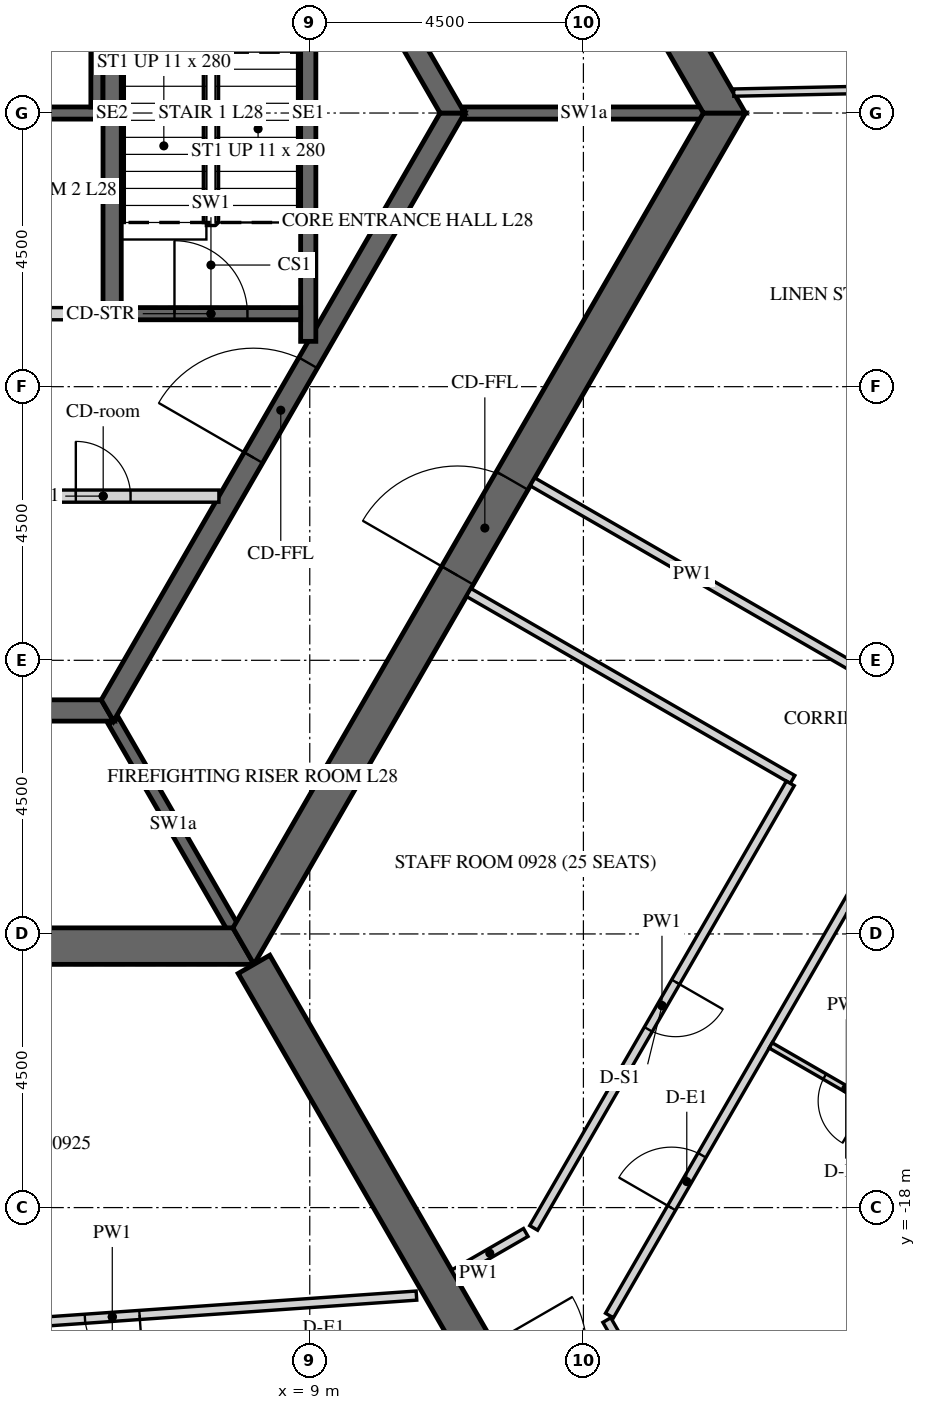
"""IFC4 building model, lengths in metres.
Left out: names, types, materials, properties, quantities, classifications, styles, units other than length and angle.
Written with IfcOpenShell. Run it as: python <this file> out.ifc"""

import sys

from ifc_helpers import new_model, si_unit, direction, frame, frame_2d, origin, place, context, subcontext, project, spatial, polyline, rectangle, outline, extrude, element, fill, save


model = new_model("IFC4")
c1 = context("Model", 3, precision=1e-05, world=origin(), true_north=direction((0.0, 1.0)))
c2 = subcontext(c1, "Body", "Model", "MODEL_VIEW")
j1 = project(units=[si_unit("LENGTHUNIT", "METRE"), si_unit("PLANEANGLEUNIT", "RADIAN")], contexts=[c1])
p1 = place(None, origin())
s1 = spatial("IfcSite", under=j1, at=p1, CompositionType="ELEMENT")
p2 = place(p1, origin())
s2 = spatial("IfcBuilding", under=s1, at=p2, CompositionType="ELEMENT")
p3 = place(p2, frame((0.0, 0.0, 123.3)))
s3 = spatial("IfcBuildingStorey", under=s2, at=p3, CompositionType="ELEMENT", Elevation=123.3)
p4 = place(p3, frame((-7.91, -13.7, -0.15), z_axis=(0.0, 0.0, 1.0), x_axis=(1.0, 0.0, 0.0)))
e1 = element("IfcWall", 1, at=p4, inside=s3, PredefinedType="SHEAR", context=c2, shape_type="SweptSolid", body=[
    extrude(outline(polyline([(-0.173, -0.3), (15.993, -0.3), (15.646, 0.3), (0.173, 0.3), (-0.173, -0.3)])), origin(), (0.0, 0.0, 1.0), 3.9),
])
p5 = place(p4, frame((7.31, 0.0, 0.15)))
e2 = element("IfcOpeningElement", 2, at=p5, cuts=e1, PredefinedType="OPENING", context=c2, shape_type="SweptSolid", body=[
    extrude(rectangle(XDim=1.2, YDim=2.4, at=frame_2d((0.6, 1.2))), frame((0.0, 0.31, 0.0), z_axis=(0.0, -1.0, 0.0), x_axis=(1.0, 0.0, 0.0)), (0.0, 0.0, 1.0), 0.62),
])
p6 = place(p3, frame((7.91, -13.7, -0.15), z_axis=(0.0, 0.0, 1.0), x_axis=(0.499999880136, 0.866025472988, 0.0)))
e3 = element("IfcWall", 3, at=p6, inside=s3, PredefinedType="SHEAR", context=c2, shape_type="SweptSolid", body=[
    extrude(outline(polyline([(-0.173, -0.3), (15.993, -0.3), (15.646, 0.3), (0.173, 0.3), (-0.173, -0.3)])), origin(), (0.0, 0.0, 1.0), 3.9),
])
p7 = place(p6, frame((7.039, 0.0, 0.15)))
e4 = element("IfcOpeningElement", 4, at=p7, cuts=e3, PredefinedType="OPENING", context=c2, shape_type="SweptSolid", body=[
    extrude(rectangle(XDim=1.8, YDim=2.4, at=frame_2d((0.9, 1.2))), frame((0.0, 0.31, 0.0), z_axis=(0.0, -1.0, 0.0), x_axis=(1.0, 0.0, 0.0)), (0.0, 0.0, 1.0), 0.62),
])
p8 = place(p3, frame((15.819, 0.0, -0.15), z_axis=(0.0, 0.0, 1.0), x_axis=(-0.499999880136, 0.866025472988, 0.0)))
e5 = element("IfcWall", 5, at=p8, inside=s3, PredefinedType="SHEAR", context=c2, shape_type="SweptSolid", body=[
    extrude(outline(polyline([(-0.173, -0.3), (15.993, -0.3), (15.646, 0.3), (0.173, 0.3), (-0.173, -0.3)])), origin(), (0.0, 0.0, 1.0), 3.9),
])
p9 = place(p8, frame((6.981, 0.0, 0.15)))
e6 = element("IfcOpeningElement", 6, at=p9, cuts=e5, PredefinedType="OPENING", context=c2, shape_type="SweptSolid", body=[
    extrude(rectangle(XDim=1.8, YDim=2.4, at=frame_2d((0.9, 1.2))), frame((0.0, 0.31, 0.0), z_axis=(0.0, -1.0, 0.0), x_axis=(1.0, 0.0, 0.0)), (0.0, 0.0, 1.0), 0.62),
])
p10 = place(p3, frame((8.083, -14.0, -0.15), z_axis=(0.0, 0.0, 1.0), x_axis=(0.499997680643, -0.866026742862, 0.0)))
e7 = element("IfcWall", 7, at=p10, inside=s3, PredefinedType="SHEAR", context=c2, shape_type="SweptSolid", body=[
    extrude(rectangle(XDim=16.509, YDim=0.6, at=frame_2d((8.254, 0.0))), origin(), (0.0, 0.0, 1.0), 3.9),
])
p11 = place(p10, frame((7.354, 0.0, 0.15)))
e8 = element("IfcOpeningElement", 8, at=p11, cuts=e7, PredefinedType="OPENING", context=c2, shape_type="SweptSolid", body=[
    extrude(rectangle(XDim=1.8, YDim=2.4, at=frame_2d((0.9, 1.2))), frame((0.0, 0.31, 0.0), z_axis=(0.0, -1.0, 0.0), x_axis=(1.0, 0.0, 0.0)), (0.0, 0.0, 1.0), 0.62),
])
p12 = place(p3, frame((-5.673, -9.825, -0.15), z_axis=(0.0, 0.0, 1.0), x_axis=(1.0, 0.0, 0.0)))
e9 = element("IfcWall", 9, at=p12, inside=s3, PredefinedType="SHEAR", context=c2, shape_type="SweptSolid", body=[
    extrude(outline(polyline([(-0.101, -0.175), (11.446, -0.175), (11.244, 0.175), (0.101, 0.175), (-0.101, -0.175)])), origin(), (0.0, 0.0, 1.0), 3.9),
])
p13 = place(p3, frame((5.673, -9.825, -0.15), z_axis=(0.0, 0.0, 1.0), x_axis=(0.499995046907, 0.866028263435, 0.0)))
e10 = element("IfcWall", 10, at=p13, inside=s3, PredefinedType="SHEAR", context=c2, shape_type="SweptSolid", body=[
    extrude(outline(polyline([(-0.101, -0.175), (11.446, -0.175), (11.244, 0.175), (0.101, 0.175), (-0.101, -0.175)])), origin(), (0.0, 0.0, 1.0), 3.9),
])
p14 = place(p13, frame((4.801, 0.0, 0.15)))
e11 = element("IfcOpeningElement", 11, at=p14, cuts=e10, PredefinedType="OPENING", context=c2, shape_type="SweptSolid", body=[
    extrude(rectangle(XDim=1.8, YDim=2.4, at=frame_2d((0.9, 1.2))), frame((0.0, 0.185, 0.0), z_axis=(0.0, -1.0, 0.0), x_axis=(1.0, 0.0, 0.0)), (0.0, 0.0, 1.0), 0.37),
])
p15 = place(p3, frame((11.345, 0.0, -0.15), z_axis=(0.0, 0.0, 1.0), x_axis=(-0.499995046907, 0.866028263435, 0.0)))
e12 = element("IfcWall", 12, at=p15, inside=s3, PredefinedType="SHEAR", context=c2, shape_type="SweptSolid", body=[
    extrude(outline(polyline([(-0.101, -0.175), (11.446, -0.175), (11.244, 0.175), (0.101, 0.175), (-0.101, -0.175)])), origin(), (0.0, 0.0, 1.0), 3.9),
])
p16 = place(p15, frame((4.744, 0.0, 0.15)))
e13 = element("IfcOpeningElement", 13, at=p16, cuts=e12, PredefinedType="OPENING", context=c2, shape_type="SweptSolid", body=[
    extrude(rectangle(XDim=1.8, YDim=2.4, at=frame_2d((0.9, 1.2))), frame((0.0, 0.185, 0.0), z_axis=(0.0, -1.0, 0.0), x_axis=(1.0, 0.0, 0.0)), (0.0, 0.0, 1.0), 0.37),
])
p17 = place(p3, frame((-5.6, 0.0, -0.25), z_axis=(0.0, 0.0, 1.0), x_axis=(1.0, 0.0, 0.0)))
e14 = element("IfcWall", 14, at=p17, inside=s3, PredefinedType="SHEAR", context=c2, shape_type="SweptSolid", body=[
    extrude(rectangle(XDim=11.2, YDim=0.2, at=frame_2d((5.6, 0.0))), origin(), (0.0, 0.0, 1.0), 3.9),
])
p18 = place(p3, frame((5.5, 0.1, -0.25), z_axis=(0.0, 0.0, 1.0), x_axis=(0.0, 1.0, 0.0)))
e15 = element("IfcWall", 15, at=p18, inside=s3, PredefinedType="SHEAR", context=c2, shape_type="SweptSolid", body=[
    extrude(rectangle(XDim=3.1, YDim=0.2, at=frame_2d((1.55, 0.0))), origin(), (0.0, 0.0, 1.0), 3.9),
])
p19 = place(p3, frame((0.1, -3.3, 0.0), z_axis=(0.0, 0.0, 1.0), x_axis=(1.0, 0.0, 0.0)))
e16 = element("IfcWall", 16, at=p19, inside=s3, PredefinedType="PARTITIONING", context=c2, shape_type="SweptSolid", body=[
    extrude(rectangle(XDim=5.5, YDim=0.2, at=frame_2d((2.75, 0.0))), origin(), (0.0, 0.0, 1.0), 3.65),
])
p20 = place(p19, frame((2.3, 0.0, 0.0)))
e17 = element("IfcOpeningElement", 17, at=p20, cuts=e16, PredefinedType="OPENING", context=c2, shape_type="SweptSolid", body=[
    extrude(rectangle(XDim=0.9, YDim=2.1, at=frame_2d((0.45, 1.05))), frame((0.0, 0.11, 0.0), z_axis=(0.0, -1.0, 0.0), x_axis=(1.0, 0.0, 0.0)), (0.0, 0.0, 1.0), 0.22),
])
p21 = place(p3, frame((3.7, -6.3, 0.0), z_axis=(0.0, 0.0, 1.0), x_axis=(1.0, 0.0, 0.0)))
e18 = element("IfcWall", 18, at=p21, inside=s3, PredefinedType="PARTITIONING", context=c2, shape_type="SweptSolid", body=[
    extrude(rectangle(XDim=3.806, YDim=0.2, at=frame_2d((1.903, 0.0))), origin(), (0.0, 0.0, 1.0), 3.65),
])
p22 = place(p21, frame((1.453, 0.0, 0.0)))
e19 = element("IfcOpeningElement", 19, at=p22, cuts=e18, PredefinedType="OPENING", context=c2, shape_type="SweptSolid", body=[
    extrude(rectangle(XDim=0.9, YDim=2.1, at=frame_2d((0.45, 1.05))), frame((0.0, 0.11, 0.0), z_axis=(0.0, -1.0, 0.0), x_axis=(1.0, 0.0, 0.0)), (0.0, 0.0, 1.0), 0.22),
])
p23 = place(p3, frame((11.547, 0.0, -0.15), z_axis=(0.0, 0.0, 1.0), x_axis=(1.0, 0.0, 0.0)))
e20 = element("IfcWall", 20, at=p23, inside=s3, PredefinedType="SHEAR", context=c2, shape_type="SweptSolid", body=[
    extrude(rectangle(XDim=3.926, YDim=0.2, at=frame_2d((1.963, 0.0))), origin(), (0.0, 0.0, 1.0), 3.9),
])
p24 = place(p3, frame((5.773, -10.0, -0.15), z_axis=(0.0, 0.0, 1.0), x_axis=(0.500038251005, -0.86600331843, 0.0)))
e21 = element("IfcWall", 21, at=p24, inside=s3, PredefinedType="SHEAR", context=c2, shape_type="SweptSolid", body=[
    extrude(rectangle(XDim=3.926, YDim=0.2, at=frame_2d((1.963, 0.0))), origin(), (0.0, 0.0, 1.0), 3.9),
])
p25 = place(p3, frame((5.75, -3.4, -0.25), z_axis=(0.0, 0.0, 1.0), x_axis=(0.0, 1.0, 0.0)))
e22 = element("IfcWall", 22, at=p25, inside=s3, PredefinedType="SHEAR", context=c2, shape_type="SweptSolid", body=[
    extrude(rectangle(XDim=6.8, YDim=0.3, at=frame_2d((3.4, 0.0))), origin(), (0.0, 0.0, 1.0), 3.9),
])
p26 = place(p3, frame((8.975, -3.755, -0.25), z_axis=(0.0, 0.0, 1.0), x_axis=(0.0, 1.0, 0.0)))
e23 = element("IfcWall", 23, at=p26, inside=s3, PredefinedType="SHEAR", context=c2, shape_type="SweptSolid", body=[
    extrude(rectangle(XDim=7.51, YDim=0.25, at=frame_2d((3.755, 0.0))), origin(), (0.0, 0.0, 1.0), 3.9),
])
p27 = place(p3, frame((5.9, -3.3, -0.25), z_axis=(0.0, 0.0, 1.0), x_axis=(1.0, 0.0, 0.0)))
e24 = element("IfcWall", 24, at=p27, inside=s3, PredefinedType="SHEAR", context=c2, shape_type="SweptSolid", body=[
    extrude(rectangle(XDim=2.95, YDim=0.2, at=frame_2d((1.475, 0.0))), origin(), (0.0, 0.0, 1.0), 3.9),
])
p28 = place(p27, frame((0.875, 0.0, 0.25)))
e25 = element("IfcOpeningElement", 25, at=p28, cuts=e24, PredefinedType="OPENING", context=c2, shape_type="SweptSolid", body=[
    extrude(rectangle(XDim=1.2, YDim=2.4, at=frame_2d((0.6, 1.2))), frame((0.0, 0.11, 0.0), z_axis=(0.0, -1.0, 0.0), x_axis=(1.0, 0.0, 0.0)), (0.0, 0.0, 1.0), 0.22),
])
p29 = place(p3, frame((10.754, -19.447, 0.0), z_axis=(0.0, 0.0, 1.0), x_axis=(-0.997564830966, -0.069745308232, 0.0)))
e26 = element("IfcWall", 26, at=p29, inside=s3, PredefinedType="PARTITIONING", context=c2, shape_type="SweptSolid", body=[
    extrude(rectangle(XDim=10.029, YDim=0.15, at=frame_2d((5.014, 0.0))), origin(), (0.0, 0.0, 1.0), 2.988),
])
p30 = place(p29, frame((4.564, 0.0, 0.0)))
e27 = element("IfcOpeningElement", 27, at=p30, cuts=e26, PredefinedType="OPENING", context=c2, shape_type="SweptSolid", body=[
    extrude(rectangle(XDim=0.9, YDim=2.1, at=frame_2d((0.45, 1.05))), frame((0.0, 0.085, 0.0), z_axis=(0.0, -1.0, 0.0), x_axis=(1.0, 0.0, 0.0)), (0.0, 0.0, 1.0), 0.17),
])
p31 = place(p3, frame((15.441, -22.545, 0.0), z_axis=(0.0, 0.0, 1.0), x_axis=(-0.500037089193, 0.86600398927, 0.0)))
e28 = element("IfcWall", 28, at=p31, inside=s3, PredefinedType="PARTITIONING", context=c2, shape_type="SweptSolid", body=[
    extrude(rectangle(XDim=3.112, YDim=0.15, at=frame_2d((1.556, 0.0))), origin(), (0.0, 0.0, 1.0), 2.988),
])
p32 = place(p3, frame((13.928, -19.775, 0.0), z_axis=(0.0, 0.0, 1.0), x_axis=(0.50000450071, 0.866022805283, 0.0)))
e29 = element("IfcWall", 29, at=p32, inside=s3, PredefinedType="PARTITIONING", context=c2, shape_type="SweptSolid", body=[
    extrude(rectangle(XDim=23.877, YDim=0.15, at=frame_2d((11.938, 0.0))), origin(), (0.0, 0.0, 1.0), 2.988),
])
p33 = place(p32, frame((2.043, 0.0, 0.0)))
e30 = element("IfcOpeningElement", 30, at=p33, cuts=e29, PredefinedType="OPENING", context=c2, shape_type="SweptSolid", body=[
    extrude(rectangle(XDim=1.0, YDim=2.1, at=frame_2d((0.5, 1.05))), frame((0.0, 0.085, 0.0), z_axis=(0.0, -1.0, 0.0), x_axis=(1.0, 0.0, 0.0)), (0.0, 0.0, 1.0), 0.17),
])
p34 = place(p32, frame((13.272, 0.0, 0.0)))
e31 = element("IfcOpeningElement", 31, at=p34, cuts=e29, PredefinedType="OPENING", context=c2, shape_type="SweptSolid", body=[
    extrude(rectangle(XDim=1.0, YDim=2.1, at=frame_2d((0.5, 1.05))), frame((0.0, 0.085, 0.0), z_axis=(0.0, -1.0, 0.0), x_axis=(1.0, 0.0, 0.0)), (0.0, 0.0, 1.0), 0.17),
])
p35 = place(p3, frame((25.821, 0.972, 0.0), z_axis=(0.0, 0.0, 1.0), x_axis=(-0.559193816298, 0.829036956845, 0.0)))
e32 = element("IfcWall", 32, at=p35, inside=s3, PredefinedType="PARTITIONING", context=c2, shape_type="SweptSolid", body=[
    extrude(rectangle(XDim=22.002, YDim=0.15, at=frame_2d((11.001, 0.0))), origin(), (0.0, 0.0, 1.0), 2.988),
])
p36 = place(p35, frame((3.369, 0.0, 0.0)))
e33 = element("IfcOpeningElement", 33, at=p36, cuts=e32, PredefinedType="OPENING", context=c2, shape_type="SweptSolid", body=[
    extrude(rectangle(XDim=1.0, YDim=2.1, at=frame_2d((0.5, 1.05))), frame((0.0, 0.085, 0.0), z_axis=(0.0, -1.0, 0.0), x_axis=(1.0, 0.0, 0.0)), (0.0, 0.0, 1.0), 0.17),
])
p37 = place(p35, frame((10.721, 0.0, 0.0)))
e34 = element("IfcOpeningElement", 34, at=p37, cuts=e32, PredefinedType="OPENING", context=c2, shape_type="SweptSolid", body=[
    extrude(rectangle(XDim=1.0, YDim=2.1, at=frame_2d((0.5, 1.05))), frame((0.0, 0.085, 0.0), z_axis=(0.0, -1.0, 0.0), x_axis=(1.0, 0.0, 0.0)), (0.0, 0.0, 1.0), 0.17),
])
p38 = place(p35, frame((20.852, 0.0, 0.0)))
e35 = element("IfcOpeningElement", 35, at=p38, cuts=e32, PredefinedType="OPENING", context=c2, shape_type="SweptSolid", body=[
    extrude(rectangle(XDim=1.0, YDim=2.1, at=frame_2d((0.5, 1.05))), frame((0.0, 0.085, 0.0), z_axis=(0.0, -1.0, 0.0), x_axis=(1.0, 0.0, 0.0)), (0.0, 0.0, 1.0), 0.17),
])
p39 = place(p3, frame((17.925, -9.103, 0.0), z_axis=(0.0, 0.0, 1.0), x_axis=(-0.866013586754, 0.500020467139, 0.0)))
e36 = element("IfcWall", 36, at=p39, inside=s3, PredefinedType="PARTITIONING", context=c2, shape_type="SweptSolid", body=[
    extrude(rectangle(XDim=6.075, YDim=0.15, at=frame_2d((3.038, 0.0))), origin(), (0.0, 0.0, 1.0), 2.988),
])
p40 = place(p3, frame((11.614, -7.884, 0.0), z_axis=(0.0, 0.0, 1.0), x_axis=(0.866033542371, -0.499985903289, 0.0)))
e37 = element("IfcWall", 37, at=p40, inside=s3, PredefinedType="PARTITIONING", context=c2, shape_type="SweptSolid", body=[
    extrude(rectangle(XDim=6.15, YDim=0.15, at=frame_2d((3.075, 0.0))), origin(), (0.0, 0.0, 1.0), 2.988),
])
p41 = place(p3, frame((16.902, -11.024, 0.0), z_axis=(0.0, 0.0, 1.0), x_axis=(-0.499999527968, -0.866025676312, 0.0)))
e38 = element("IfcWall", 38, at=p41, inside=s3, PredefinedType="PARTITIONING", context=c2, shape_type="SweptSolid", body=[
    extrude(rectangle(XDim=8.441, YDim=0.15, at=frame_2d((4.22, 0.0))), origin(), (0.0, 0.0, 1.0), 2.988),
])
p42 = place(p41, frame((3.771, 0.0, 0.0)))
e39 = element("IfcOpeningElement", 39, at=p42, cuts=e38, PredefinedType="OPENING", context=c2, shape_type="SweptSolid", body=[
    extrude(rectangle(XDim=0.9, YDim=2.1, at=frame_2d((0.45, 1.05))), frame((0.0, 0.085, 0.0), z_axis=(0.0, -1.0, 0.0), x_axis=(1.0, 0.0, 0.0)), (0.0, 0.0, 1.0), 0.17),
])
p43 = place(p3, frame((12.552, -18.409, 0.0), z_axis=(0.0, 0.0, 1.0), x_axis=(-0.866078408764, -0.499908181442, 0.0)))
e40 = element("IfcWall", 40, at=p43, inside=s3, PredefinedType="PARTITIONING", context=c2, shape_type="SweptSolid", body=[
    extrude(rectangle(XDim=1.365, YDim=0.15, at=frame_2d((0.683, 0.0))), origin(), (0.0, 0.0, 1.0), 2.988),
])
p44 = place(p3, frame((19.07, -16.771, 0.0), z_axis=(0.0, 0.0, 1.0), x_axis=(-0.866018712932, 0.500011588718, 0.0)))
e41 = element("IfcWall", 41, at=p44, inside=s3, PredefinedType="PARTITIONING", context=c2, shape_type="SweptSolid", body=[
    extrude(rectangle(XDim=2.875, YDim=0.1, at=frame_2d((1.438, 0.0))), origin(), (0.0, 0.0, 1.0), 2.988),
])
p45 = place(p44, frame((1.05, 0.0, 0.0)))
e42 = element("IfcOpeningElement", 42, at=p45, cuts=e41, PredefinedType="OPENING", context=c2, shape_type="SweptSolid", body=[
    extrude(rectangle(XDim=0.8, YDim=2.1, at=frame_2d((0.4, 1.05))), frame((0.0, 0.06, 0.0), z_axis=(0.0, -1.0, 0.0), x_axis=(1.0, 0.0, 0.0)), (0.0, 0.0, 1.0), 0.12),
])
p46 = place(p3, frame((24.31, -16.794, 0.0), z_axis=(0.0, 0.0, 1.0), x_axis=(-0.866022965479, 0.500004223245, 0.0)))
e43 = element("IfcWall", 43, at=p46, inside=s3, PredefinedType="PARTITIONING", context=c2, shape_type="SweptSolid", body=[
    extrude(rectangle(XDim=7.425, YDim=0.18, at=frame_2d((3.713, 0.0))), origin(), (0.0, 0.0, 1.0), 2.988),
])
p47 = place(p3, frame((23.466, 0.493, 0.0), z_axis=(0.0, 0.0, 1.0), x_axis=(-0.999779281543, -0.021009240783, 0.0)))
e44 = element("IfcWall", 44, at=p47, inside=s3, PredefinedType="PARTITIONING", context=c2, shape_type="SweptSolid", body=[
    extrude(rectangle(XDim=7.495, YDim=0.12, at=frame_2d((3.748, 0.0))), origin(), (0.0, 0.0, 1.0), 2.988),
])
p48 = place(p7, origin())
e45 = element("IfcDoor", 45, at=p48, inside=s3, OperationType="DOUBLE_DOOR_SINGLE_SWING", PredefinedType="DOOR", context=c2, shape_type="SweptSolid", body=[
    extrude(rectangle(XDim=1.8, YDim=2.4, at=frame_2d((0.9, 1.2))), frame((0.0, 0.025, 0.0), z_axis=(0.0, -1.0, 0.0), x_axis=(1.0, 0.0, 0.0)), (0.0, 0.0, 1.0), 0.05),
])
fill(e4, e45)
p49 = place(p14, origin())
e46 = element("IfcDoor", 46, at=p49, inside=s3, OperationType="DOUBLE_DOOR_SINGLE_SWING", PredefinedType="DOOR", context=c2, shape_type="SweptSolid", body=[
    extrude(rectangle(XDim=1.8, YDim=2.4, at=frame_2d((0.9, 1.2))), frame((0.0, 0.025, 0.0), z_axis=(0.0, -1.0, 0.0), x_axis=(1.0, 0.0, 0.0)), (0.0, 0.0, 1.0), 0.05),
])
fill(e11, e46)
p50 = place(p22, origin())
e47 = element("IfcDoor", 47, at=p50, inside=s3, OperationType="SINGLE_SWING_LEFT", PredefinedType="DOOR", context=c2, shape_type="SweptSolid", body=[
    extrude(rectangle(XDim=0.9, YDim=2.1, at=frame_2d((0.45, 1.05))), frame((0.0, 0.025, 0.0), z_axis=(0.0, -1.0, 0.0), x_axis=(1.0, 0.0, 0.0)), (0.0, 0.0, 1.0), 0.05),
])
fill(e19, e47)
p51 = place(p28, origin())
e48 = element("IfcDoor", 48, at=p51, inside=s3, OperationType="SINGLE_SWING_LEFT", PredefinedType="DOOR", context=c2, shape_type="SweptSolid", body=[
    extrude(rectangle(XDim=1.2, YDim=2.4, at=frame_2d((0.6, 1.2))), frame((0.0, 0.025, 0.0), z_axis=(0.0, -1.0, 0.0), x_axis=(1.0, 0.0, 0.0)), (0.0, 0.0, 1.0), 0.05),
])
fill(e25, e48)
p52 = place(p33, origin())
e49 = element("IfcDoor", 49, at=p52, inside=s3, OperationType="SINGLE_SWING_RIGHT", PredefinedType="DOOR", context=c2, shape_type="SweptSolid", body=[
    extrude(rectangle(XDim=1.0, YDim=2.1, at=frame_2d((0.5, 1.05))), frame((0.0, 0.025, 0.0), z_axis=(0.0, -1.0, 0.0), x_axis=(1.0, 0.0, 0.0)), (0.0, 0.0, 1.0), 0.05),
])
fill(e30, e49)
p53 = place(p45, origin())
e50 = element("IfcDoor", 50, at=p53, inside=s3, OperationType="SINGLE_SWING_LEFT", PredefinedType="DOOR", context=c2, shape_type="SweptSolid", body=[
    extrude(rectangle(XDim=0.8, YDim=2.1, at=frame_2d((0.4, 1.05))), frame((0.0, 0.025, 0.0), z_axis=(0.0, -1.0, 0.0), x_axis=(1.0, 0.0, 0.0)), (0.0, 0.0, 1.0), 0.05),
])
fill(e42, e50)
p54 = place(p30, origin())
e51 = element("IfcDoor", 51, at=p54, inside=s3, OperationType="SINGLE_SWING_LEFT", PredefinedType="DOOR", context=c2, shape_type="SweptSolid", body=[
    extrude(rectangle(XDim=0.9, YDim=2.1, at=frame_2d((0.45, 1.05))), frame((0.0, 0.025, 0.0), z_axis=(0.0, -1.0, 0.0), x_axis=(1.0, 0.0, 0.0)), (0.0, 0.0, 1.0), 0.05),
])
fill(e27, e51)
p55 = place(p42, origin())
e52 = element("IfcDoor", 52, at=p55, inside=s3, OperationType="SINGLE_SWING_RIGHT", PredefinedType="DOOR", context=c2, shape_type="SweptSolid", body=[
    extrude(rectangle(XDim=0.9, YDim=2.1, at=frame_2d((0.45, 1.05))), frame((0.0, 0.025, 0.0), z_axis=(0.0, -1.0, 0.0), x_axis=(1.0, 0.0, 0.0)), (0.0, 0.0, 1.0), 0.05),
])
fill(e39, e52)
save(model, sys.argv[1])
